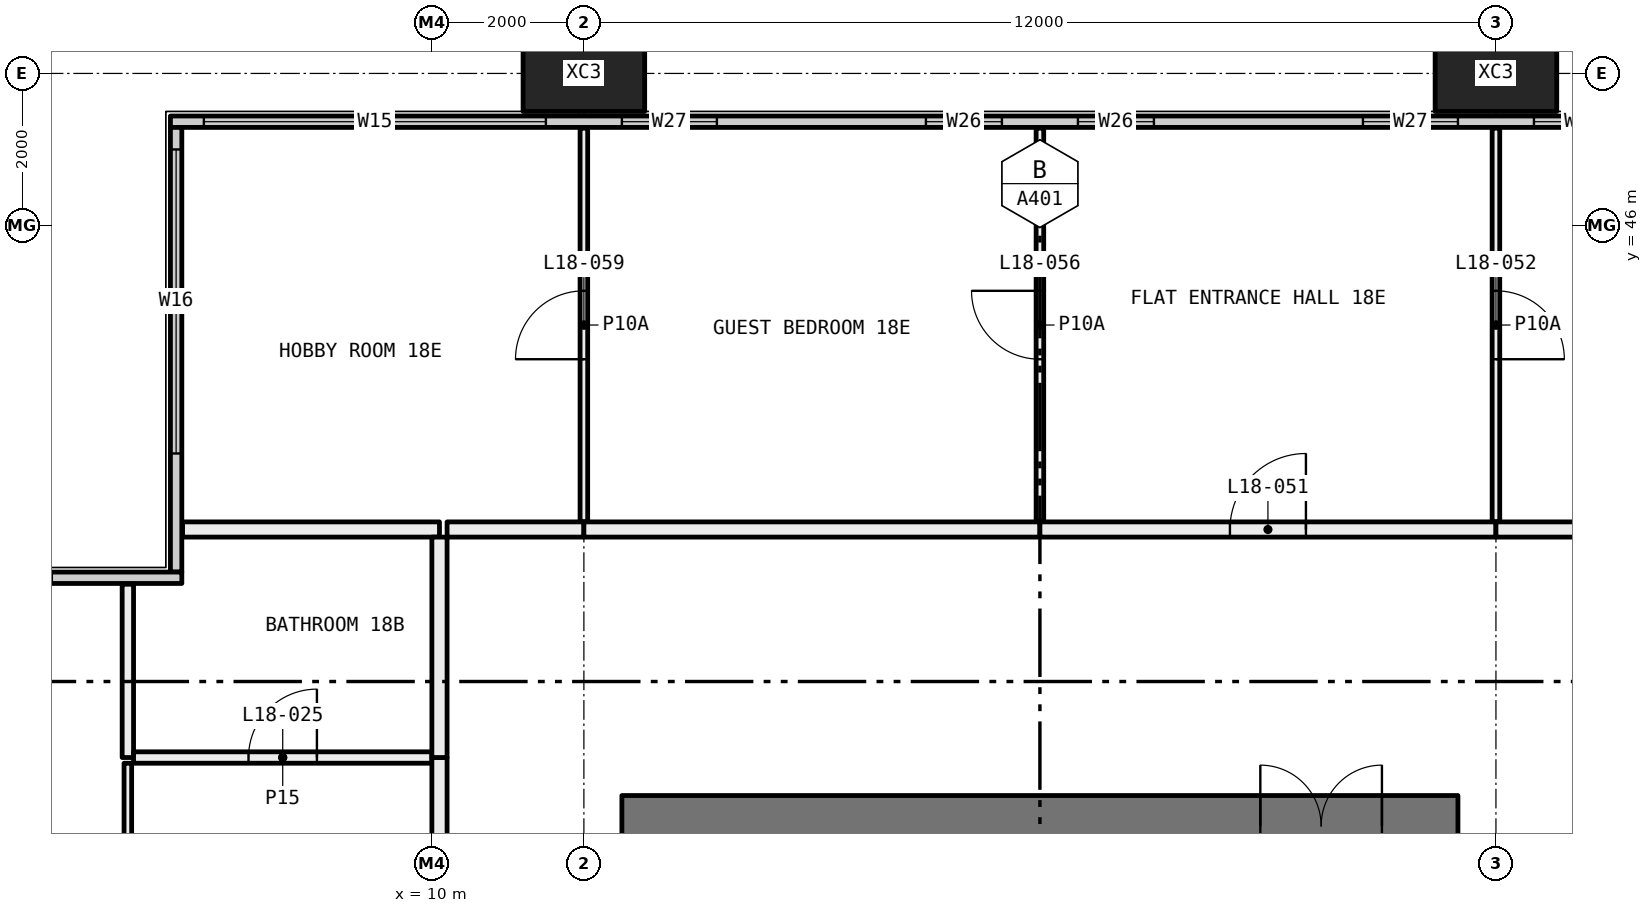
"""IFC4 building model, lengths in metres.
Left out: names, types, materials, properties, quantities, classifications, styles, units other than length and angle.
Written with IfcOpenShell. Run it as: python <this file> out.ifc"""

import sys

from ifc_helpers import new_model, si_unit, direction, frame, frame_2d, origin, origin_2d, place, context, subcontext, project, spatial, rectangle, hollow_rectangle, extrude, element, fill, save


model = new_model("IFC4")
c1 = context("Model", 3, precision=1e-05, world=origin(), true_north=direction((0.0, 1.0)))
c2 = subcontext(c1, "Body", "Model", "MODEL_VIEW")
j1 = project(units=[si_unit("LENGTHUNIT", "METRE"), si_unit("PLANEANGLEUNIT", "RADIAN")], contexts=[c1])
p1 = place(None, origin())
s1 = spatial("IfcSite", under=j1, at=p1, CompositionType="ELEMENT")
p2 = place(p1, origin())
s2 = spatial("IfcBuilding", under=s1, at=p2, CompositionType="ELEMENT")
p3 = place(p2, frame((0.0, 0.0, 74.85)))
s3 = spatial("IfcBuildingStorey", under=s2, at=p3, CompositionType="ELEMENT", Elevation=74.85)
for number, where, z_axis, x_axis in (
    (1, (12.0, 48.0, -0.4), (0.0, 0.0, 1.0), (1.0, 0.0, 0.0)),
    (2, (24.0, 48.0, -0.4), (0.0, 0.0, 1.0), (1.0, 0.0, 0.0)),
):
    element("IfcColumn", number, at=place(p3, frame(where, z_axis=z_axis, x_axis=x_axis)), inside=s3, PredefinedType="COLUMN", context=c2, shape_type="SweptSolid", body=[
        extrude(hollow_rectangle(XDim=1.6, YDim=1.0, WallThickness=0.065, at=origin_2d()), origin(), (0.0, 0.0, 1.0), 3.45),
    ])
p4 = place(p3, frame((6.56, 47.365, 0.0), z_axis=(0.0, 0.0, 1.0), x_axis=(1.0, 0.0, 0.0)))
e3 = element("IfcWall", 3, at=p4, inside=s3, PredefinedType="ELEMENTEDWALL", context=c2, shape_type="SweptSolid", body=[
    extrude(rectangle(XDim=58.88, YDim=0.15, at=frame_2d((29.44, 0.0))), origin(), (0.0, 0.0, 1.0), 3.05),
])
p5 = place(p4, frame((0.44, 0.0, 0.45)))
e4 = element("IfcOpeningElement", 4, at=p5, cuts=e3, PredefinedType="OPENING", context=c2, shape_type="SweptSolid", body=[
    extrude(rectangle(XDim=4.5, YDim=2.55, at=frame_2d((2.25, 1.275))), frame((0.0, 0.085, 0.0), z_axis=(0.0, -1.0, 0.0), x_axis=(1.0, 0.0, 0.0)), (0.0, 0.0, 1.0), 0.17),
])
p6 = place(p4, frame((5.94, 0.0, 0.45)))
e5 = element("IfcOpeningElement", 5, at=p6, cuts=e3, PredefinedType="OPENING", context=c2, shape_type="SweptSolid", body=[
    extrude(rectangle(XDim=1.25, YDim=2.55, at=frame_2d((0.625, 1.275))), frame((0.0, 0.085, 0.0), z_axis=(0.0, -1.0, 0.0), x_axis=(1.0, 0.0, 0.0)), (0.0, 0.0, 1.0), 0.17),
])
p7 = place(p4, frame((9.94, 0.0, 0.45)))
e6 = element("IfcOpeningElement", 6, at=p7, cuts=e3, PredefinedType="OPENING", context=c2, shape_type="SweptSolid", body=[
    extrude(rectangle(XDim=1.0, YDim=2.55, at=frame_2d((0.5, 1.275))), frame((0.0, 0.085, 0.0), z_axis=(0.0, -1.0, 0.0), x_axis=(1.0, 0.0, 0.0)), (0.0, 0.0, 1.0), 0.17),
])
p8 = place(p4, frame((11.94, 0.0, 0.45)))
e7 = element("IfcOpeningElement", 7, at=p8, cuts=e3, PredefinedType="OPENING", context=c2, shape_type="SweptSolid", body=[
    extrude(rectangle(XDim=1.0, YDim=2.55, at=frame_2d((0.5, 1.275))), frame((0.0, 0.085, 0.0), z_axis=(0.0, -1.0, 0.0), x_axis=(1.0, 0.0, 0.0)), (0.0, 0.0, 1.0), 0.17),
])
p9 = place(p4, frame((15.69, 0.0, 0.45)))
e8 = element("IfcOpeningElement", 8, at=p9, cuts=e3, PredefinedType="OPENING", context=c2, shape_type="SweptSolid", body=[
    extrude(rectangle(XDim=1.25, YDim=2.55, at=frame_2d((0.625, 1.275))), frame((0.0, 0.085, 0.0), z_axis=(0.0, -1.0, 0.0), x_axis=(1.0, 0.0, 0.0)), (0.0, 0.0, 1.0), 0.17),
])
p10 = place(p4, frame((17.94, 0.0, 0.45)))
e9 = element("IfcOpeningElement", 9, at=p10, cuts=e3, PredefinedType="OPENING", context=c2, shape_type="SweptSolid", body=[
    extrude(rectangle(XDim=1.25, YDim=2.55, at=frame_2d((0.625, 1.275))), frame((0.0, 0.085, 0.0), z_axis=(0.0, -1.0, 0.0), x_axis=(1.0, 0.0, 0.0)), (0.0, 0.0, 1.0), 0.17),
])
p11 = place(p4, frame((21.94, 0.0, 0.45)))
e10 = element("IfcOpeningElement", 10, at=p11, cuts=e3, PredefinedType="OPENING", context=c2, shape_type="SweptSolid", body=[
    extrude(rectangle(XDim=1.0, YDim=2.55, at=frame_2d((0.5, 1.275))), frame((0.0, 0.085, 0.0), z_axis=(0.0, -1.0, 0.0), x_axis=(1.0, 0.0, 0.0)), (0.0, 0.0, 1.0), 0.17),
])
p12 = place(p4, frame((23.94, 0.0, 0.45)))
e11 = element("IfcOpeningElement", 11, at=p12, cuts=e3, PredefinedType="OPENING", context=c2, shape_type="SweptSolid", body=[
    extrude(rectangle(XDim=1.0, YDim=2.55, at=frame_2d((0.5, 1.275))), frame((0.0, 0.085, 0.0), z_axis=(0.0, -1.0, 0.0), x_axis=(1.0, 0.0, 0.0)), (0.0, 0.0, 1.0), 0.17),
])
p13 = place(p4, frame((27.69, 0.0, 0.45)))
e12 = element("IfcOpeningElement", 12, at=p13, cuts=e3, PredefinedType="OPENING", context=c2, shape_type="SweptSolid", body=[
    extrude(rectangle(XDim=1.25, YDim=2.55, at=frame_2d((0.625, 1.275))), frame((0.0, 0.085, 0.0), z_axis=(0.0, -1.0, 0.0), x_axis=(1.0, 0.0, 0.0)), (0.0, 0.0, 1.0), 0.17),
])
p14 = place(p4, frame((29.94, 0.0, 0.45)))
e13 = element("IfcOpeningElement", 13, at=p14, cuts=e3, PredefinedType="OPENING", context=c2, shape_type="SweptSolid", body=[
    extrude(rectangle(XDim=1.25, YDim=2.55, at=frame_2d((0.625, 1.275))), frame((0.0, 0.085, 0.0), z_axis=(0.0, -1.0, 0.0), x_axis=(1.0, 0.0, 0.0)), (0.0, 0.0, 1.0), 0.17),
])
p15 = place(p4, frame((33.94, 0.0, 0.45)))
e14 = element("IfcOpeningElement", 14, at=p15, cuts=e3, PredefinedType="OPENING", context=c2, shape_type="SweptSolid", body=[
    extrude(rectangle(XDim=1.0, YDim=2.55, at=frame_2d((0.5, 1.275))), frame((0.0, 0.085, 0.0), z_axis=(0.0, -1.0, 0.0), x_axis=(1.0, 0.0, 0.0)), (0.0, 0.0, 1.0), 0.17),
])
p16 = place(p4, frame((35.94, 0.0, 0.45)))
e15 = element("IfcOpeningElement", 15, at=p16, cuts=e3, PredefinedType="OPENING", context=c2, shape_type="SweptSolid", body=[
    extrude(rectangle(XDim=1.0, YDim=2.55, at=frame_2d((0.5, 1.275))), frame((0.0, 0.085, 0.0), z_axis=(0.0, -1.0, 0.0), x_axis=(1.0, 0.0, 0.0)), (0.0, 0.0, 1.0), 0.17),
])
p17 = place(p4, frame((39.69, 0.0, 0.45)))
e16 = element("IfcOpeningElement", 16, at=p17, cuts=e3, PredefinedType="OPENING", context=c2, shape_type="SweptSolid", body=[
    extrude(rectangle(XDim=1.25, YDim=2.55, at=frame_2d((0.625, 1.275))), frame((0.0, 0.085, 0.0), z_axis=(0.0, -1.0, 0.0), x_axis=(1.0, 0.0, 0.0)), (0.0, 0.0, 1.0), 0.17),
])
p18 = place(p4, frame((41.94, 0.0, 0.45)))
e17 = element("IfcOpeningElement", 17, at=p18, cuts=e3, PredefinedType="OPENING", context=c2, shape_type="SweptSolid", body=[
    extrude(rectangle(XDim=1.25, YDim=2.55, at=frame_2d((0.625, 1.275))), frame((0.0, 0.085, 0.0), z_axis=(0.0, -1.0, 0.0), x_axis=(1.0, 0.0, 0.0)), (0.0, 0.0, 1.0), 0.17),
])
p19 = place(p4, frame((45.94, 0.0, 0.45)))
e18 = element("IfcOpeningElement", 18, at=p19, cuts=e3, PredefinedType="OPENING", context=c2, shape_type="SweptSolid", body=[
    extrude(rectangle(XDim=1.0, YDim=2.55, at=frame_2d((0.5, 1.275))), frame((0.0, 0.085, 0.0), z_axis=(0.0, -1.0, 0.0), x_axis=(1.0, 0.0, 0.0)), (0.0, 0.0, 1.0), 0.17),
])
p20 = place(p4, frame((47.94, 0.0, 0.45)))
e19 = element("IfcOpeningElement", 19, at=p20, cuts=e3, PredefinedType="OPENING", context=c2, shape_type="SweptSolid", body=[
    extrude(rectangle(XDim=1.0, YDim=2.55, at=frame_2d((0.5, 1.275))), frame((0.0, 0.085, 0.0), z_axis=(0.0, -1.0, 0.0), x_axis=(1.0, 0.0, 0.0)), (0.0, 0.0, 1.0), 0.17),
])
p21 = place(p4, frame((51.69, 0.0, 0.45)))
e20 = element("IfcOpeningElement", 20, at=p21, cuts=e3, PredefinedType="OPENING", context=c2, shape_type="SweptSolid", body=[
    extrude(rectangle(XDim=1.25, YDim=2.55, at=frame_2d((0.625, 1.275))), frame((0.0, 0.085, 0.0), z_axis=(0.0, -1.0, 0.0), x_axis=(1.0, 0.0, 0.0)), (0.0, 0.0, 1.0), 0.17),
])
p22 = place(p4, frame((53.94, 0.0, 0.45)))
e21 = element("IfcOpeningElement", 21, at=p22, cuts=e3, PredefinedType="OPENING", context=c2, shape_type="SweptSolid", body=[
    extrude(rectangle(XDim=4.5, YDim=2.55, at=frame_2d((2.25, 1.275))), frame((0.0, 0.085, 0.0), z_axis=(0.0, -1.0, 0.0), x_axis=(1.0, 0.0, 0.0)), (0.0, 0.0, 1.0), 0.17),
])
p23 = place(p3, frame((6.635, 41.44, 0.0), z_axis=(0.0, 0.0, 1.0), x_axis=(0.0, 1.0, 0.0)))
e22 = element("IfcWall", 22, at=p23, inside=s3, PredefinedType="ELEMENTEDWALL", context=c2, shape_type="SweptSolid", body=[
    extrude(rectangle(XDim=5.85, YDim=0.15, at=frame_2d((2.925, 0.0))), origin(), (0.0, 0.0, 1.0), 3.05),
])
p24 = place(p23, frame((1.56, 0.0, 0.45)))
e23 = element("IfcOpeningElement", 23, at=p24, cuts=e22, PredefinedType="OPENING", context=c2, shape_type="SweptSolid", body=[
    extrude(rectangle(XDim=4.0, YDim=2.55, at=frame_2d((2.0, 1.275))), frame((0.0, 0.085, 0.0), z_axis=(0.0, -1.0, 0.0), x_axis=(1.0, 0.0, 0.0)), (0.0, 0.0, 1.0), 0.17),
])
p25 = place(p3, frame((0.56, 41.365, 0.0), z_axis=(0.0, 0.0, 1.0), x_axis=(1.0, 0.0, 0.0)))
e24 = element("IfcWall", 24, at=p25, inside=s3, PredefinedType="ELEMENTEDWALL", context=c2, shape_type="SweptSolid", body=[
    extrude(rectangle(XDim=6.15, YDim=0.15, at=frame_2d((3.075, 0.0))), origin(), (0.0, 0.0, 1.0), 3.05),
])
p26 = place(p25, frame((0.44, 0.0, 0.45)))
e25 = element("IfcOpeningElement", 25, at=p26, cuts=e24, PredefinedType="OPENING", context=c2, shape_type="SweptSolid", body=[
    extrude(rectangle(XDim=4.0, YDim=2.55, at=frame_2d((2.0, 1.275))), frame((0.0, 0.085, 0.0), z_axis=(0.0, -1.0, 0.0), x_axis=(1.0, 0.0, 0.0)), (0.0, 0.0, 1.0), 0.17),
])
p27 = place(p3, frame((6.0, 36.05, 0.0), z_axis=(0.0, 0.0, 1.0), x_axis=(0.0, 1.0, 0.0)))
e26 = element("IfcWall", 26, at=p27, inside=s3, PredefinedType="PARTITIONING", context=c2, shape_type="SweptSolid", body=[
    extrude(rectangle(XDim=2.875, YDim=0.1, at=frame_2d((1.438, 0.0))), origin(), (0.0, 0.0, 1.0), 2.45),
])
p28 = place(p3, frame((6.0, 39.0, 0.0), z_axis=(0.0, 0.0, 1.0), x_axis=(0.0, 1.0, 0.0)))
e27 = element("IfcWall", 27, at=p28, inside=s3, PredefinedType="PARTITIONING", context=c2, shape_type="SweptSolid", body=[
    extrude(rectangle(XDim=2.28, YDim=0.15, at=frame_2d((1.14, 0.0))), origin(), (0.0, 0.0, 1.0), 3.05),
])
p29 = place(p3, frame((10.0, 39.0, 0.0), z_axis=(0.0, 0.0, 1.0), x_axis=(-1.0, 0.0, 0.0)))
e28 = element("IfcWall", 28, at=p29, inside=s3, PredefinedType="PARTITIONING", context=c2, shape_type="SweptSolid", body=[
    extrude(rectangle(XDim=3.925, YDim=0.15, at=frame_2d((1.962, 0.0))), origin(), (0.0, 0.0, 1.0), 3.05),
])
p30 = place(p29, frame((1.512, 0.0, 0.0)))
e29 = element("IfcOpeningElement", 29, at=p30, cuts=e28, PredefinedType="OPENING", context=c2, shape_type="SweptSolid", body=[
    extrude(rectangle(XDim=0.9, YDim=2.1, at=frame_2d((0.45, 1.05))), frame((0.0, 0.085, 0.0), z_axis=(0.0, -1.0, 0.0), x_axis=(1.0, 0.0, 0.0)), (0.0, 0.0, 1.0), 0.17),
])
p31 = place(p3, frame((10.1, 36.1, 0.0), z_axis=(0.0, 0.0, 1.0), x_axis=(0.0, 1.0, 0.0)))
e30 = element("IfcWall", 30, at=p31, inside=s3, PredefinedType="PARTITIONING", context=c2, shape_type="SweptSolid", body=[
    extrude(rectangle(XDim=2.9, YDim=0.2, at=frame_2d((1.45, 0.0))), origin(), (0.0, 0.0, 1.0), 3.05),
])
p32 = place(p3, frame((10.1, 42.0, 0.0), z_axis=(0.0, 0.0, 1.0), x_axis=(-1.0, 0.0, 0.0)))
e31 = element("IfcWall", 31, at=p32, inside=s3, PredefinedType="PARTITIONING", context=c2, shape_type="SweptSolid", body=[
    extrude(rectangle(XDim=3.38, YDim=0.2, at=frame_2d((1.69, 0.0))), origin(), (0.0, 0.0, 1.0), 3.05),
])
p33 = place(p3, frame((10.1, 39.0, 0.0), z_axis=(0.0, 0.0, 1.0), x_axis=(0.0, 1.0, 0.0)))
e32 = element("IfcWall", 32, at=p33, inside=s3, PredefinedType="PARTITIONING", context=c2, shape_type="SweptSolid", body=[
    extrude(rectangle(XDim=2.9, YDim=0.2, at=frame_2d((1.45, 0.0))), origin(), (0.0, 0.0, 1.0), 3.05),
])
p34 = place(p3, frame((12.0, 42.1, 0.0), z_axis=(0.0, 0.0, 1.0), x_axis=(0.0, 1.0, 0.0)))
e33 = element("IfcWall", 33, at=p34, inside=s3, PredefinedType="PARTITIONING", context=c2, shape_type="SweptSolid", body=[
    extrude(rectangle(XDim=5.18, YDim=0.1, at=frame_2d((2.59, 0.0))), origin(), (0.0, 0.0, 1.0), 3.05),
])
p35 = place(p34, frame((2.14, 0.0, 0.0)))
e34 = element("IfcOpeningElement", 34, at=p35, cuts=e33, PredefinedType="OPENING", context=c2, shape_type="SweptSolid", body=[
    extrude(rectangle(XDim=0.9, YDim=2.1, at=frame_2d((0.45, 1.05))), frame((0.0, 0.06, 0.0), z_axis=(0.0, -1.0, 0.0), x_axis=(1.0, 0.0, 0.0)), (0.0, 0.0, 1.0), 0.12),
])
p36 = place(p3, frame((10.2, 42.0, 0.0), z_axis=(0.0, 0.0, 1.0), x_axis=(1.0, 0.0, 0.0)))
e35 = element("IfcWall", 35, at=p36, inside=s3, PredefinedType="PARTITIONING", context=c2, shape_type="SweptSolid", body=[
    extrude(rectangle(XDim=1.8, YDim=0.2, at=frame_2d((0.9, 0.0))), origin(), (0.0, 0.0, 1.0), 3.05),
])
p37 = place(p3, frame((18.0, 42.1, 0.0), z_axis=(0.0, 0.0, 1.0), x_axis=(0.0, 1.0, 0.0)))
e36 = element("IfcWall", 36, at=p37, inside=s3, PredefinedType="PARTITIONING", context=c2, shape_type="SweptSolid", body=[
    extrude(rectangle(XDim=5.18, YDim=0.1, at=frame_2d((2.59, 0.0))), origin(), (0.0, 0.0, 1.0), 3.05),
])
p38 = place(p37, frame((2.14, 0.0, 0.0)))
e37 = element("IfcOpeningElement", 37, at=p38, cuts=e36, PredefinedType="OPENING", context=c2, shape_type="SweptSolid", body=[
    extrude(rectangle(XDim=0.9, YDim=2.1, at=frame_2d((0.45, 1.05))), frame((0.0, 0.06, 0.0), z_axis=(0.0, -1.0, 0.0), x_axis=(1.0, 0.0, 0.0)), (0.0, 0.0, 1.0), 0.12),
])
p39 = place(p3, frame((12.0, 42.0, 0.0), z_axis=(0.0, 0.0, 1.0), x_axis=(1.0, 0.0, 0.0)))
e38 = element("IfcWall", 38, at=p39, inside=s3, PredefinedType="PARTITIONING", context=c2, shape_type="SweptSolid", body=[
    extrude(rectangle(XDim=6.0, YDim=0.2, at=frame_2d((3.0, 0.0))), origin(), (0.0, 0.0, 1.0), 3.05),
])
p40 = place(p3, frame((24.0, 42.1, 0.0), z_axis=(0.0, 0.0, 1.0), x_axis=(0.0, 1.0, 0.0)))
e39 = element("IfcWall", 39, at=p40, inside=s3, PredefinedType="PARTITIONING", context=c2, shape_type="SweptSolid", body=[
    extrude(rectangle(XDim=5.18, YDim=0.1, at=frame_2d((2.59, 0.0))), origin(), (0.0, 0.0, 1.0), 3.05),
])
p41 = place(p40, frame((2.14, 0.0, 0.0)))
e40 = element("IfcOpeningElement", 40, at=p41, cuts=e39, PredefinedType="OPENING", context=c2, shape_type="SweptSolid", body=[
    extrude(rectangle(XDim=0.9, YDim=2.1, at=frame_2d((0.45, 1.05))), frame((0.0, 0.06, 0.0), z_axis=(0.0, -1.0, 0.0), x_axis=(1.0, 0.0, 0.0)), (0.0, 0.0, 1.0), 0.12),
])
p42 = place(p3, frame((18.0, 42.0, 0.0), z_axis=(0.0, 0.0, 1.0), x_axis=(1.0, 0.0, 0.0)))
e41 = element("IfcWall", 41, at=p42, inside=s3, PredefinedType="PARTITIONING", context=c2, shape_type="SweptSolid", body=[
    extrude(rectangle(XDim=6.0, YDim=0.2, at=frame_2d((3.0, 0.0))), origin(), (0.0, 0.0, 1.0), 3.05),
])
p43 = place(p42, frame((2.5, 0.0, 0.0)))
e42 = element("IfcOpeningElement", 42, at=p43, cuts=e41, PredefinedType="OPENING", context=c2, shape_type="SweptSolid", body=[
    extrude(rectangle(XDim=1.0, YDim=2.1, at=frame_2d((0.5, 1.05))), frame((0.0, 0.11, 0.0), z_axis=(0.0, -1.0, 0.0), x_axis=(1.0, 0.0, 0.0)), (0.0, 0.0, 1.0), 0.22),
])
p44 = place(p3, frame((24.0, 42.0, 0.0), z_axis=(0.0, 0.0, 1.0), x_axis=(1.0, 0.0, 0.0)))
e43 = element("IfcWall", 43, at=p44, inside=s3, PredefinedType="PARTITIONING", context=c2, shape_type="SweptSolid", body=[
    extrude(rectangle(XDim=1.9, YDim=0.2, at=frame_2d((0.95, 0.0))), origin(), (0.0, 0.0, 1.0), 3.05),
])
p45 = place(p3, frame((12.5, 38.1, 0.0), z_axis=(0.0, 0.0, 1.0), x_axis=(1.0, 0.0, 0.0)))
e44 = element("IfcWall", 44, at=p45, inside=s3, PredefinedType="SHEAR", context=c2, shape_type="SweptSolid", body=[
    extrude(rectangle(XDim=11.0, YDim=0.8, at=frame_2d((5.5, 0.0))), origin(), (0.0, 0.0, 1.0), 3.05),
])
p46 = place(p45, frame((8.4, 0.0, 0.0)))
e45 = element("IfcOpeningElement", 45, at=p46, cuts=e44, PredefinedType="OPENING", context=c2, shape_type="SweptSolid", body=[
    extrude(rectangle(XDim=1.6, YDim=2.1, at=frame_2d((0.8, 1.05))), frame((0.0, 0.41, 0.0), z_axis=(0.0, -1.0, 0.0), x_axis=(1.0, 0.0, 0.0)), (0.0, 0.0, 1.0), 0.82),
])
p47 = place(p5, origin())
e46 = element("IfcWindow", 46, at=p47, inside=s3, PartitioningType="SINGLE_PANEL", PredefinedType="WINDOW", context=c2, shape_type="SweptSolid", body=[
    extrude(rectangle(XDim=4.5, YDim=2.55, at=frame_2d((2.25, 1.275))), frame((0.0, 0.03, 0.0), z_axis=(0.0, -1.0, 0.0), x_axis=(1.0, 0.0, 0.0)), (0.0, 0.0, 1.0), 0.06),
])
fill(e4, e46)
p48 = place(p6, origin())
e47 = element("IfcWindow", 47, at=p48, inside=s3, PartitioningType="SINGLE_PANEL", PredefinedType="WINDOW", context=c2, shape_type="SweptSolid", body=[
    extrude(rectangle(XDim=1.25, YDim=2.55, at=frame_2d((0.625, 1.275))), frame((0.0, 0.03, 0.0), z_axis=(0.0, -1.0, 0.0), x_axis=(1.0, 0.0, 0.0)), (0.0, 0.0, 1.0), 0.06),
])
fill(e5, e47)
p49 = place(p7, origin())
e48 = element("IfcWindow", 48, at=p49, inside=s3, PartitioningType="SINGLE_PANEL", PredefinedType="WINDOW", context=c2, shape_type="SweptSolid", body=[
    extrude(rectangle(XDim=1.0, YDim=2.55, at=frame_2d((0.5, 1.275))), frame((0.0, 0.03, 0.0), z_axis=(0.0, -1.0, 0.0), x_axis=(1.0, 0.0, 0.0)), (0.0, 0.0, 1.0), 0.06),
])
fill(e6, e48)
p50 = place(p8, origin())
e49 = element("IfcWindow", 49, at=p50, inside=s3, PartitioningType="SINGLE_PANEL", PredefinedType="WINDOW", context=c2, shape_type="SweptSolid", body=[
    extrude(rectangle(XDim=1.0, YDim=2.55, at=frame_2d((0.5, 1.275))), frame((0.0, 0.03, 0.0), z_axis=(0.0, -1.0, 0.0), x_axis=(1.0, 0.0, 0.0)), (0.0, 0.0, 1.0), 0.06),
])
fill(e7, e49)
p51 = place(p9, origin())
e50 = element("IfcWindow", 50, at=p51, inside=s3, PartitioningType="SINGLE_PANEL", PredefinedType="WINDOW", context=c2, shape_type="SweptSolid", body=[
    extrude(rectangle(XDim=1.25, YDim=2.55, at=frame_2d((0.625, 1.275))), frame((0.0, 0.03, 0.0), z_axis=(0.0, -1.0, 0.0), x_axis=(1.0, 0.0, 0.0)), (0.0, 0.0, 1.0), 0.06),
])
fill(e8, e50)
p52 = place(p10, origin())
e51 = element("IfcWindow", 51, at=p52, inside=s3, PartitioningType="SINGLE_PANEL", PredefinedType="WINDOW", context=c2, shape_type="SweptSolid", body=[
    extrude(rectangle(XDim=1.25, YDim=2.55, at=frame_2d((0.625, 1.275))), frame((0.0, 0.03, 0.0), z_axis=(0.0, -1.0, 0.0), x_axis=(1.0, 0.0, 0.0)), (0.0, 0.0, 1.0), 0.06),
])
fill(e9, e51)
p53 = place(p24, origin())
e52 = element("IfcWindow", 52, at=p53, inside=s3, PartitioningType="SINGLE_PANEL", PredefinedType="WINDOW", context=c2, shape_type="SweptSolid", body=[
    extrude(rectangle(XDim=4.0, YDim=2.55, at=frame_2d((2.0, 1.275))), frame((0.0, 0.03, 0.0), z_axis=(0.0, -1.0, 0.0), x_axis=(1.0, 0.0, 0.0)), (0.0, 0.0, 1.0), 0.06),
])
fill(e23, e52)
p54 = place(p30, frame((0.9, 0.0, 0.0), x_axis=(-1.0, 0.0, 0.0)))
e53 = element("IfcDoor", 53, at=p54, inside=s3, OperationType="SINGLE_SWING_LEFT", PredefinedType="DOOR", context=c2, shape_type="SweptSolid", body=[
    extrude(rectangle(XDim=0.9, YDim=2.1, at=frame_2d((0.45, 1.05))), frame((0.0, 0.025, 0.0), z_axis=(0.0, -1.0, 0.0), x_axis=(1.0, 0.0, 0.0)), (0.0, 0.0, 1.0), 0.05),
])
fill(e29, e53)
p55 = place(p43, origin())
e54 = element("IfcDoor", 54, at=p55, inside=s3, OperationType="SINGLE_SWING_LEFT", PredefinedType="DOOR", context=c2, shape_type="SweptSolid", body=[
    extrude(rectangle(XDim=1.0, YDim=2.1, at=frame_2d((0.5, 1.05))), frame((0.0, 0.025, 0.0), z_axis=(0.0, -1.0, 0.0), x_axis=(1.0, 0.0, 0.0)), (0.0, 0.0, 1.0), 0.05),
])
fill(e42, e54)
p56 = place(p41, frame((0.9, 0.0, 0.0), x_axis=(-1.0, 0.0, 0.0)))
e55 = element("IfcDoor", 55, at=p56, inside=s3, OperationType="SINGLE_SWING_LEFT", PredefinedType="DOOR", context=c2, shape_type="SweptSolid", body=[
    extrude(rectangle(XDim=0.9, YDim=2.1, at=frame_2d((0.45, 1.05))), frame((0.0, 0.025, 0.0), z_axis=(0.0, -1.0, 0.0), x_axis=(1.0, 0.0, 0.0)), (0.0, 0.0, 1.0), 0.05),
])
fill(e40, e55)
p57 = place(p38, origin())
e56 = element("IfcDoor", 56, at=p57, inside=s3, OperationType="SINGLE_SWING_LEFT", PredefinedType="DOOR", context=c2, shape_type="SweptSolid", body=[
    extrude(rectangle(XDim=0.9, YDim=2.1, at=frame_2d((0.45, 1.05))), frame((0.0, 0.025, 0.0), z_axis=(0.0, -1.0, 0.0), x_axis=(1.0, 0.0, 0.0)), (0.0, 0.0, 1.0), 0.05),
])
fill(e37, e56)
p58 = place(p35, origin())
e57 = element("IfcDoor", 57, at=p58, inside=s3, OperationType="SINGLE_SWING_RIGHT", PredefinedType="DOOR", context=c2, shape_type="SweptSolid", body=[
    extrude(rectangle(XDim=0.9, YDim=2.1, at=frame_2d((0.45, 1.05))), frame((0.0, 0.025, 0.0), z_axis=(0.0, -1.0, 0.0), x_axis=(1.0, 0.0, 0.0)), (0.0, 0.0, 1.0), 0.05),
])
fill(e34, e57)
p59 = place(p46, origin())
e58 = element("IfcDoor", 58, at=p59, inside=s3, OperationType="DOUBLE_DOOR_SINGLE_SWING", PredefinedType="DOOR", context=c2, shape_type="SweptSolid", body=[
    extrude(rectangle(XDim=1.6, YDim=2.1, at=frame_2d((0.8, 1.05))), frame((0.0, 0.025, 0.0), z_axis=(0.0, -1.0, 0.0), x_axis=(1.0, 0.0, 0.0)), (0.0, 0.0, 1.0), 0.05),
])
fill(e45, e58)
save(model, sys.argv[1])
